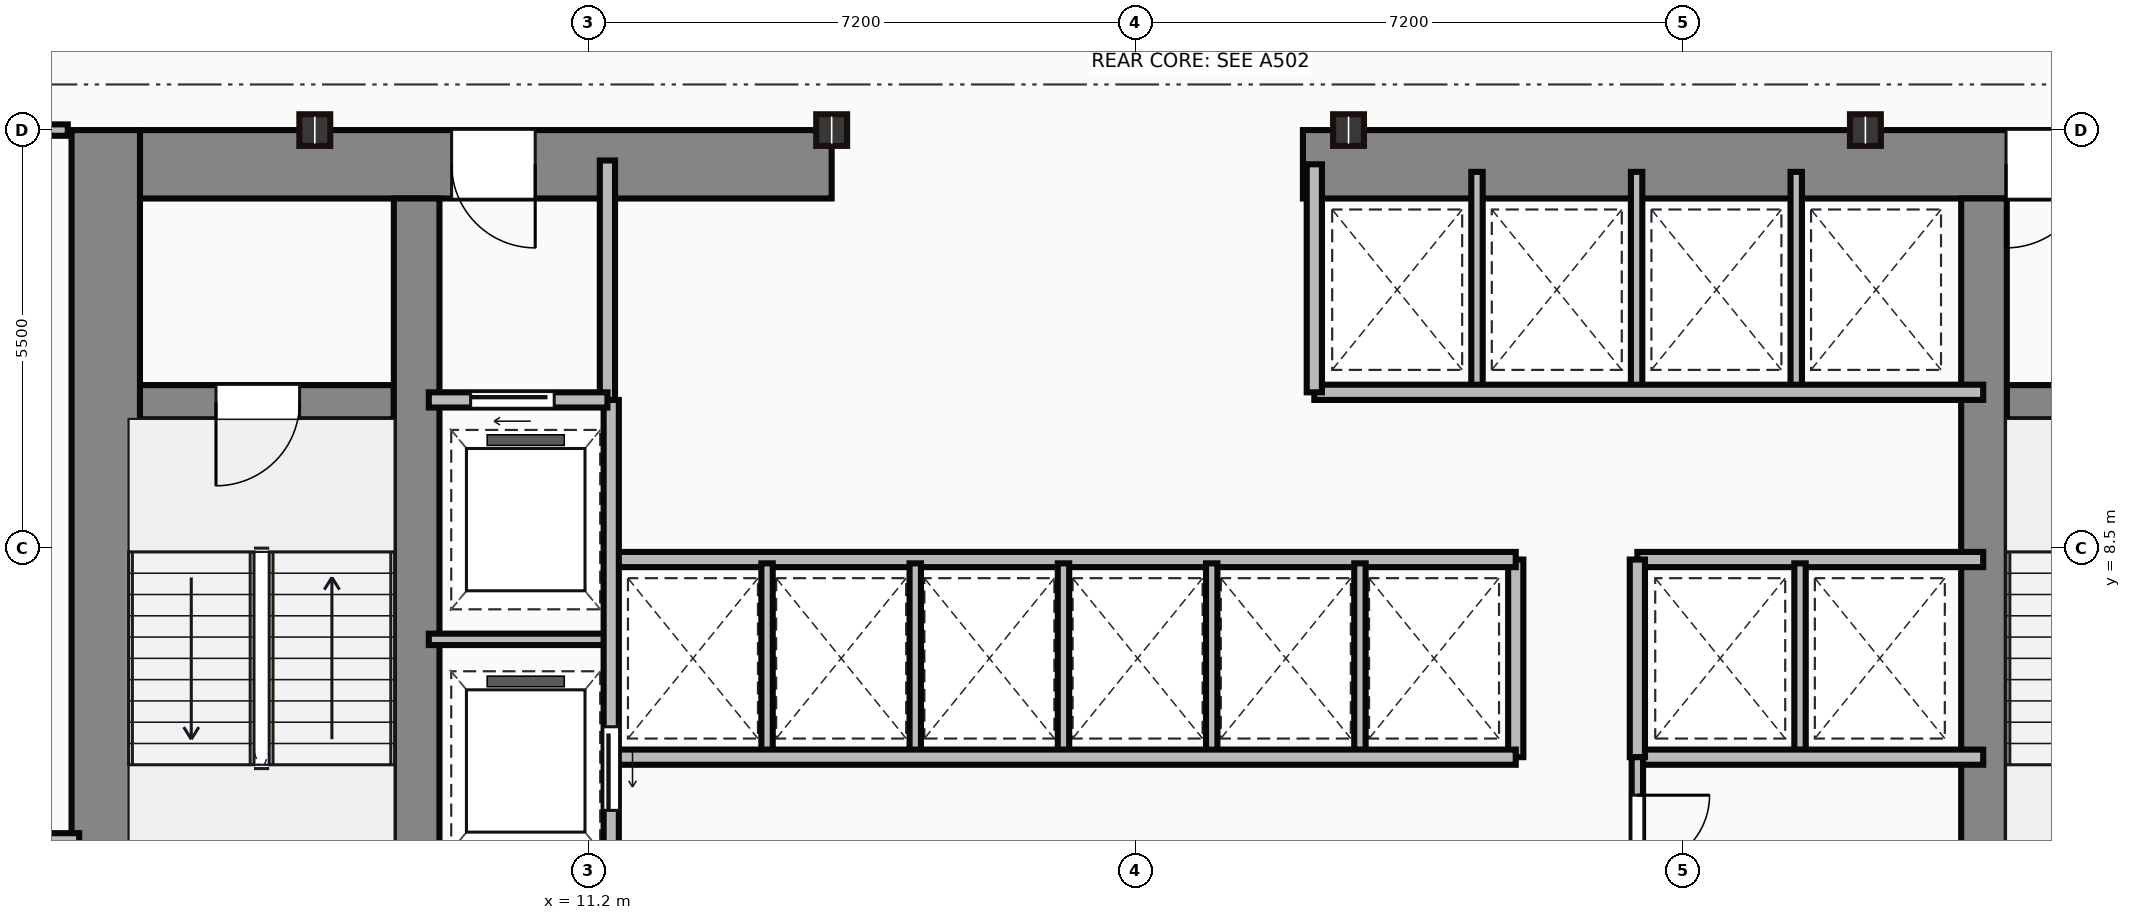
"""IFC4 building model, lengths in metres.
Left out: names, types, materials, properties, quantities, classifications, styles, units other than length and angle.
Written with IfcOpenShell. Run it as: python <this file> out.ifc"""

import sys

from ifc_helpers import new_model, si_unit, direction, frame, frame_2d, origin, origin_2d, place, context, subcontext, project, spatial, rectangle, i_section, extrude, source, transform, mapped, element, fill, save


model = new_model("IFC4")
c1 = context("Model", 3, precision=1e-05, world=origin(), true_north=direction((0.0, 1.0)))
c2 = subcontext(c1, "Body", "Model", "MODEL_VIEW")
j1 = project(units=[si_unit("LENGTHUNIT", "METRE"), si_unit("PLANEANGLEUNIT", "RADIAN")], contexts=[c1])
p1 = place(None, origin())
s1 = spatial("IfcSite", under=j1, at=p1, CompositionType="ELEMENT")
p2 = place(p1, origin())
s2 = spatial("IfcBuilding", under=s1, at=p2, CompositionType="ELEMENT")
p3 = place(p2, frame((0.0, 0.0, 32.5)))
s3 = spatial("IfcBuildingStorey", under=s2, at=p3, CompositionType="ELEMENT", Elevation=32.5)
m1 = source(origin(), c2, "Body", "SweptSolid", [
    extrude(rectangle(XDim=13.1, YDim=0.9, at=frame_2d((6.55, 0.0))), origin(), (0.0, 0.0, 1.0), 3.65),
])
p4 = place(p3, frame((4.85, 0.9, 0.0), z_axis=(0.0, 0.0, 1.0), x_axis=(0.0, 1.0, 0.0)))
e1 = element("IfcWall", 1, at=p4, inside=s3, PredefinedType="SHEAR", context=c2, shape_type="MappedRepresentation", body=[
    mapped(m1, transform((0.0, 0.0, 0.0))),
])
m2 = source(origin(), c2, "Body", "SweptSolid", [
    extrude(rectangle(XDim=9.1, YDim=0.9, at=frame_2d((4.55, 0.0))), origin(), (0.0, 0.0, 1.0), 3.65),
])
p5 = place(p3, frame((5.3, 13.55, 0.0), z_axis=(0.0, 0.0, 1.0), x_axis=(1.0, 0.0, 0.0)))
e2 = element("IfcWall", 2, at=p5, inside=s3, PredefinedType="SHEAR", context=c2, shape_type="MappedRepresentation", body=[
    mapped(m2, transform((0.0, 0.0, 0.0))),
])
p6 = place(p5, frame((4.1, 0.0, 0.0)))
e3 = element("IfcOpeningElement", 3, at=p6, cuts=e2, PredefinedType="OPENING", context=c2, shape_type="SweptSolid", body=[
    extrude(rectangle(XDim=1.1, YDim=2.15, at=frame_2d((0.55, 1.075))), frame((0.0, 0.46, 0.0), z_axis=(0.0, -1.0, 0.0), x_axis=(1.0, 0.0, 0.0)), (0.0, 0.0, 1.0), 0.92),
])
m3 = source(origin(), c2, "Body", "SweptSolid", [
    extrude(rectangle(XDim=12.6, YDim=0.9, at=frame_2d((6.3, 0.0))), origin(), (0.0, 0.0, 1.0), 3.65),
])
p7 = place(p3, frame((20.6, 13.55, 0.0), z_axis=(0.0, 0.0, 1.0), x_axis=(1.0, 0.0, 0.0)))
e4 = element("IfcWall", 4, at=p7, inside=s3, PredefinedType="SHEAR", context=c2, shape_type="MappedRepresentation", body=[
    mapped(m3, transform((0.0, 0.0, 0.0))),
])
p8 = place(p7, frame((9.25, 0.0, 0.0)))
e5 = element("IfcOpeningElement", 5, at=p8, cuts=e4, PredefinedType="OPENING", context=c2, shape_type="SweptSolid", body=[
    extrude(rectangle(XDim=1.1, YDim=2.15, at=frame_2d((0.55, 1.075))), frame((0.0, 0.46, 0.0), z_axis=(0.0, -1.0, 0.0), x_axis=(1.0, 0.0, 0.0)), (0.0, 0.0, 1.0), 0.92),
])
m4 = source(origin(), c2, "Body", "SweptSolid", [
    extrude(rectangle(XDim=12.2, YDim=0.6, at=frame_2d((6.1, 0.0))), origin(), (0.0, 0.0, 1.0), 3.65),
])
for number, where, z_axis, x_axis in (
    (6, (8.94, 0.9, 0.0), (0.0, 0.0, 1.0), (0.0, 1.0, 0.0)),
    (7, (29.56, 0.9, 0.0), (0.0, 0.0, 1.0), (0.0, 1.0, 0.0)),
):
    element("IfcWall", number, at=place(p3, frame(where, z_axis=z_axis, x_axis=x_axis)), inside=s3, PredefinedType="SHEAR", context=c2, shape_type="MappedRepresentation", body=[
        mapped(m4, transform((0.0, 0.0, 0.0))),
    ])
m5 = source(origin(), c2, "Body", "SweptSolid", [
    extrude(rectangle(XDim=3.39, YDim=0.45, at=frame_2d((1.695, 0.0))), origin(), (0.0, 0.0, 1.0), 3.65),
])
p9 = place(p3, frame((5.25, 10.42, 0.0), z_axis=(0.0, 0.0, 1.0), x_axis=(1.0, 0.0, 0.0)))
e8 = element("IfcWall", 8, at=p9, inside=s3, PredefinedType="SHEAR", context=c2, shape_type="MappedRepresentation", body=[
    mapped(m5, transform((0.0, 0.0, 0.0))),
])
p10 = place(p9, frame((1.05, 0.0, 0.0)))
e9 = element("IfcOpeningElement", 9, at=p10, cuts=e8, PredefinedType="OPENING", context=c2, shape_type="SweptSolid", body=[
    extrude(rectangle(XDim=1.1, YDim=2.15, at=frame_2d((0.55, 1.075))), frame((0.0, 0.235, 0.0), z_axis=(0.0, -1.0, 0.0), x_axis=(1.0, 0.0, 0.0)), (0.0, 0.0, 1.0), 0.47),
])
p11 = place(p3, frame((29.86, 10.42, 0.0), z_axis=(0.0, 0.0, 1.0), x_axis=(1.0, 0.0, 0.0)))
e10 = element("IfcWall", 10, at=p11, inside=s3, PredefinedType="SHEAR", context=c2, shape_type="MappedRepresentation", body=[
    mapped(m5, transform((0.0, 0.0, 0.0))),
])
p12 = place(p11, frame((1.1, 0.0, 0.0)))
e11 = element("IfcOpeningElement", 11, at=p12, cuts=e10, PredefinedType="OPENING", context=c2, shape_type="SweptSolid", body=[
    extrude(rectangle(XDim=1.1, YDim=2.15, at=frame_2d((0.55, 1.075))), frame((0.0, 0.235, 0.0), z_axis=(0.0, -1.0, 0.0), x_axis=(1.0, 0.0, 0.0)), (0.0, 0.0, 1.0), 0.47),
])
m6 = source(origin(), c2, "Body", "SweptSolid", [
    extrude(i_section(OverallWidth=0.406, OverallDepth=0.416, WebThickness=0.03, FlangeThickness=0.048, at=origin_2d()), origin(), (0.0, 0.0, 1.0), 3.65),
])
for number, where, z_axis, x_axis in (
    (12, (7.6, 14.0, 0.0), (0.0, 0.0, 1.0), (1.0, 0.0, 0.0)),
    (13, (14.4, 14.0, 0.0), (0.0, 0.0, 1.0), (1.0, 0.0, 0.0)),
    (14, (21.2, 14.0, 0.0), (0.0, 0.0, 1.0), (1.0, 0.0, 0.0)),
    (15, (28.0, 14.0, 0.0), (0.0, 0.0, 1.0), (1.0, 0.0, 0.0)),
):
    element("IfcColumn", number, at=place(p3, frame(where, z_axis=z_axis, x_axis=x_axis)), inside=s3, PredefinedType="COLUMN", context=c2, shape_type="MappedRepresentation", body=[
        mapped(m6, transform((0.0, 0.0, 0.0))),
    ])
m7 = source(origin(), c2, "Body", "SweptSolid", [
    extrude(rectangle(XDim=4.5, YDim=0.25, at=frame_2d((2.25, 0.0))), origin(), (0.0, 0.0, 1.0), 3.4),
])
p13 = place(p3, frame((0.0, 4.625, 0.0), z_axis=(0.0, 0.0, 1.0), x_axis=(1.0, 0.0, 0.0)))
e16 = element("IfcWall", 16, at=p13, inside=s3, PredefinedType="STANDARD", context=c2, shape_type="MappedRepresentation", body=[
    mapped(m7, transform((0.0, 0.0, 0.0))),
])
m8 = source(origin(), c2, "Body", "SweptSolid", [
    extrude(rectangle(XDim=3.18, YDim=0.2, at=frame_2d((1.59, 0.0))), origin(), (0.0, 0.0, 1.0), 3.4),
])
p14 = place(p3, frame((11.45, 10.42, 0.0), z_axis=(0.0, 0.0, 1.0), x_axis=(0.0, 1.0, 0.0)))
e17 = element("IfcWall", 17, at=p14, inside=s3, PredefinedType="PARTITIONING", context=c2, shape_type="MappedRepresentation", body=[
    mapped(m8, transform((0.0, 0.0, 0.0))),
])
m9 = source(origin(), c2, "Body", "SweptSolid", [
    extrude(rectangle(XDim=2.35, YDim=0.2, at=frame_2d((1.175, 0.0))), origin(), (0.0, 0.0, 1.0), 3.4),
])
p15 = place(p3, frame((9.1, 10.45, 0.0), z_axis=(0.0, 0.0, 1.0), x_axis=(1.0, 0.0, 0.0)))
e18 = element("IfcWall", 18, at=p15, inside=s3, PredefinedType="PARTITIONING", context=c2, shape_type="MappedRepresentation", body=[
    mapped(m9, transform((0.0, 0.0, 0.0))),
])
p16 = place(p15, frame((0.55, 0.0, 0.0)))
e19 = element("IfcOpeningElement", 19, at=p16, cuts=e18, PredefinedType="OPENING", context=c2, shape_type="SweptSolid", body=[
    extrude(rectangle(XDim=1.1, YDim=2.15, at=frame_2d((0.55, 1.075))), frame((0.0, 0.11, 0.0), z_axis=(0.0, -1.0, 0.0), x_axis=(1.0, 0.0, 0.0)), (0.0, 0.0, 1.0), 0.22),
])
m10 = source(origin(), c2, "Body", "SweptSolid", [
    extrude(rectangle(XDim=9.6, YDim=0.2, at=frame_2d((4.8, 0.0))), origin(), (0.0, 0.0, 1.0), 3.4),
])
p17 = place(p3, frame((11.5, 0.85, 0.0), z_axis=(0.0, 0.0, 1.0), x_axis=(0.0, 1.0, 0.0)))
e20 = element("IfcWall", 20, at=p17, inside=s3, PredefinedType="PARTITIONING", context=c2, shape_type="MappedRepresentation", body=[
    mapped(m10, transform((0.0, 0.0, 0.0))),
])
p18 = place(p17, frame((4.2, 0.0, 0.0)))
e21 = element("IfcOpeningElement", 21, at=p18, cuts=e20, PredefinedType="OPENING", context=c2, shape_type="SweptSolid", body=[
    extrude(rectangle(XDim=1.1, YDim=2.15, at=frame_2d((0.55, 1.075))), frame((0.0, 0.11, 0.0), z_axis=(0.0, -1.0, 0.0), x_axis=(1.0, 0.0, 0.0)), (0.0, 0.0, 1.0), 0.22),
])
p19 = place(p17, frame((0.9, 0.0, 0.0)))
e22 = element("IfcOpeningElement", 22, at=p19, cuts=e20, PredefinedType="OPENING", context=c2, shape_type="SweptSolid", body=[
    extrude(rectangle(XDim=1.2, YDim=2.15, at=frame_2d((0.6, 1.075))), frame((0.0, 0.11, 0.0), z_axis=(0.0, -1.0, 0.0), x_axis=(1.0, 0.0, 0.0)), (0.0, 0.0, 1.0), 0.22),
])
m11 = source(origin(), c2, "Body", "SweptSolid", [
    extrude(rectangle(XDim=2.4, YDim=0.15, at=frame_2d((1.2, 0.0))), origin(), (0.0, 0.0, 1.0), 3.4),
])
p20 = place(p3, frame((9.1, 7.3, 0.0), z_axis=(0.0, 0.0, 1.0), x_axis=(1.0, 0.0, 0.0)))
e23 = element("IfcWall", 23, at=p20, inside=s3, PredefinedType="PARTITIONING", context=c2, shape_type="MappedRepresentation", body=[
    mapped(m11, transform((0.0, 0.0, 0.0))),
])
m12 = source(origin(), c2, "Body", "SweptSolid", [
    extrude(rectangle(XDim=11.85, YDim=0.2, at=frame_2d((5.925, 0.0))), origin(), (0.0, 0.0, 1.0), 3.4),
])
for number, where, z_axis, x_axis in (
    (24, (11.55, 5.75, 0.0), (0.0, 0.0, 1.0), (1.0, 0.0, 0.0)),
    (25, (11.55, 8.35, 0.0), (0.0, 0.0, 1.0), (1.0, 0.0, 0.0)),
):
    element("IfcWall", number, at=place(p3, frame(where, z_axis=z_axis, x_axis=x_axis)), inside=s3, PredefinedType="PARTITIONING", context=c2, shape_type="MappedRepresentation", body=[
        mapped(m12, transform((0.0, 0.0, 0.0))),
    ])
m13 = source(origin(), c2, "Body", "SweptSolid", [
    extrude(rectangle(XDim=2.6, YDim=0.2, at=frame_2d((1.3, 0.0))), origin(), (0.0, 0.0, 1.0), 3.4),
])
p21 = place(p3, frame((23.4, 5.75, 0.0), z_axis=(0.0, 0.0, 1.0), x_axis=(0.0, 1.0, 0.0)))
e26 = element("IfcWall", 26, at=p21, inside=s3, PredefinedType="PARTITIONING", context=c2, shape_type="MappedRepresentation", body=[
    mapped(m13, transform((0.0, 0.0, 0.0))),
])
m14 = source(origin(), c2, "Body", "SweptSolid", [
    extrude(rectangle(XDim=2.5, YDim=0.15, at=frame_2d((1.25, 0.0))), origin(), (0.0, 0.0, 1.0), 3.4),
])
for number, where, z_axis, x_axis in (
    (27, (13.55, 5.8, 0.0), (0.0, 0.0, 1.0), (0.0, 1.0, 0.0)),
    (28, (15.5, 5.8, 0.0), (0.0, 0.0, 1.0), (0.0, 1.0, 0.0)),
    (29, (17.45, 5.8, 0.0), (0.0, 0.0, 1.0), (0.0, 1.0, 0.0)),
    (30, (19.4, 5.8, 0.0), (0.0, 0.0, 1.0), (0.0, 1.0, 0.0)),
    (31, (21.35, 5.8, 0.0), (0.0, 0.0, 1.0), (0.0, 1.0, 0.0)),
):
    element("IfcWall", number, at=place(p3, frame(where, z_axis=z_axis, x_axis=x_axis)), inside=s3, PredefinedType="PARTITIONING", context=c2, shape_type="MappedRepresentation", body=[
        mapped(m14, transform((0.0, 0.0, 0.0))),
    ])
m15 = source(origin(), c2, "Body", "SweptSolid", [
    extrude(rectangle(XDim=8.8, YDim=0.2, at=frame_2d((4.4, 0.0))), origin(), (0.0, 0.0, 1.0), 3.4),
])
p22 = place(p3, frame((20.75, 10.55, 0.0), z_axis=(0.0, 0.0, 1.0), x_axis=(1.0, 0.0, 0.0)))
e32 = element("IfcWall", 32, at=p22, inside=s3, PredefinedType="PARTITIONING", context=c2, shape_type="MappedRepresentation", body=[
    mapped(m15, transform((0.0, 0.0, 0.0))),
])
m16 = source(origin(), c2, "Body", "SweptSolid", [
    extrude(rectangle(XDim=3.0, YDim=0.2, at=frame_2d((1.5, 0.0))), origin(), (0.0, 0.0, 1.0), 3.4),
])
p23 = place(p3, frame((20.75, 10.55, 0.0), z_axis=(0.0, 0.0, 1.0), x_axis=(0.0, 1.0, 0.0)))
e33 = element("IfcWall", 33, at=p23, inside=s3, PredefinedType="PARTITIONING", context=c2, shape_type="MappedRepresentation", body=[
    mapped(m16, transform((0.0, 0.0, 0.0))),
])
m17 = source(origin(), c2, "Body", "SweptSolid", [
    extrude(rectangle(XDim=2.85, YDim=0.15, at=frame_2d((1.425, 0.0))), origin(), (0.0, 0.0, 1.0), 3.4),
])
for number, where, z_axis, x_axis in (
    (34, (22.89, 10.6, 0.0), (0.0, 0.0, 1.0), (0.0, 1.0, 0.0)),
    (35, (24.99, 10.6, 0.0), (0.0, 0.0, 1.0), (0.0, 1.0, 0.0)),
    (36, (27.09, 10.6, 0.0), (0.0, 0.0, 1.0), (0.0, 1.0, 0.0)),
):
    element("IfcWall", number, at=place(p3, frame(where, z_axis=z_axis, x_axis=x_axis)), inside=s3, PredefinedType="PARTITIONING", context=c2, shape_type="MappedRepresentation", body=[
        mapped(m17, transform((0.0, 0.0, 0.0))),
    ])
m18 = source(origin(), c2, "Body", "SweptSolid", [
    extrude(rectangle(XDim=4.55, YDim=0.2, at=frame_2d((2.275, 0.0))), origin(), (0.0, 0.0, 1.0), 3.4),
])
for number, where, z_axis, x_axis in (
    (37, (25.0, 8.35, 0.0), (0.0, 0.0, 1.0), (1.0, 0.0, 0.0)),
    (38, (25.0, 5.75, 0.0), (0.0, 0.0, 1.0), (1.0, 0.0, 0.0)),
):
    element("IfcWall", number, at=place(p3, frame(where, z_axis=z_axis, x_axis=x_axis)), inside=s3, PredefinedType="PARTITIONING", context=c2, shape_type="MappedRepresentation", body=[
        mapped(m18, transform((0.0, 0.0, 0.0))),
    ])
p24 = place(p3, frame((25.0, 5.75, 0.0), z_axis=(0.0, 0.0, 1.0), x_axis=(0.0, 1.0, 0.0)))
e39 = element("IfcWall", 39, at=p24, inside=s3, PredefinedType="PARTITIONING", context=c2, shape_type="MappedRepresentation", body=[
    mapped(m13, transform((0.0, 0.0, 0.0))),
])
p25 = place(p3, frame((27.14, 5.8, 0.0), z_axis=(0.0, 0.0, 1.0), x_axis=(0.0, 1.0, 0.0)))
e40 = element("IfcWall", 40, at=p25, inside=s3, PredefinedType="PARTITIONING", context=c2, shape_type="MappedRepresentation", body=[
    mapped(m14, transform((0.0, 0.0, 0.0))),
])
m19 = source(origin(), c2, "Body", "SweptSolid", [
    extrude(rectangle(XDim=4.9, YDim=0.15, at=frame_2d((2.45, 0.0))), origin(), (0.0, 0.0, 1.0), 3.4),
])
p26 = place(p3, frame((25.0, 0.85, 0.0), z_axis=(0.0, 0.0, 1.0), x_axis=(0.0, 1.0, 0.0)))
e41 = element("IfcWall", 41, at=p26, inside=s3, PredefinedType="PARTITIONING", context=c2, shape_type="MappedRepresentation", body=[
    mapped(m19, transform((0.0, 0.0, 0.0))),
])
p27 = place(p26, frame((1.8, 0.0, 0.0)))
e42 = element("IfcOpeningElement", 42, at=p27, cuts=e41, PredefinedType="OPENING", context=c2, shape_type="SweptSolid", body=[
    extrude(rectangle(XDim=0.95, YDim=2.15, at=frame_2d((0.475, 1.075))), frame((0.0, 0.085, 0.0), z_axis=(0.0, -1.0, 0.0), x_axis=(1.0, 0.0, 0.0)), (0.0, 0.0, 1.0), 0.17),
])
p28 = place(p26, frame((3.45, 0.0, 0.0)))
e43 = element("IfcOpeningElement", 43, at=p28, cuts=e41, PredefinedType="OPENING", context=c2, shape_type="SweptSolid", body=[
    extrude(rectangle(XDim=0.95, YDim=2.15, at=frame_2d((0.475, 1.075))), frame((0.0, 0.085, 0.0), z_axis=(0.0, -1.0, 0.0), x_axis=(1.0, 0.0, 0.0)), (0.0, 0.0, 1.0), 0.17),
])
m20 = source(origin(), c2, "Body", "SweptSolid", [
    extrude(rectangle(XDim=0.95, YDim=0.15, at=frame_2d((0.475, 0.0))), origin(), (0.0, 0.0, 1.0), 2.625),
])
p29 = place(p3, frame((4.35, 14.0, 0.0), z_axis=(0.0, 0.0, 1.0), x_axis=(-1.0, 0.0, 0.0)))
e44 = element("IfcWall", 44, at=p29, inside=s3, PredefinedType="PARTITIONING", context=c2, shape_type="MappedRepresentation", body=[
    mapped(m20, transform((0.0, 0.0, 0.0))),
])
m21 = source(origin(), c2, "Body", "SweptSolid", [
    extrude(rectangle(XDim=1.1, YDim=2.15, at=frame_2d((0.55, 1.075))), frame((0.0, 0.025, 0.0), z_axis=(0.0, -1.0, 0.0), x_axis=(1.0, 0.0, 0.0)), (0.0, 0.0, 1.0), 0.05),
])
p30 = place(p10, frame((1.1, 0.0, 0.0), z_axis=(0.0, 0.0, 1.0), x_axis=(-1.0, 0.0, 0.0)))
e45 = element("IfcDoor", 45, at=p30, inside=s3, OperationType="SINGLE_SWING_LEFT", PredefinedType="DOOR", context=c2, shape_type="MappedRepresentation", body=[
    mapped(m21, transform((0.0, 0.0, 0.0))),
])
fill(e9, e45)
p31 = place(p6, origin())
e46 = element("IfcDoor", 46, at=p31, inside=s3, OperationType="SINGLE_SWING_RIGHT", PredefinedType="DOOR", context=c2, shape_type="MappedRepresentation", body=[
    mapped(m21, transform((0.0, 0.0, 0.0))),
])
fill(e3, e46)
p32 = place(p8, origin())
e47 = element("IfcDoor", 47, at=p32, inside=s3, OperationType="SINGLE_SWING_LEFT", PredefinedType="DOOR", context=c2, shape_type="MappedRepresentation", body=[
    mapped(m21, transform((0.0, 0.0, 0.0))),
])
fill(e5, e47)
p33 = place(p16, origin())
e48 = element("IfcDoor", 48, at=p33, inside=s3, OperationType="SLIDING_TO_LEFT", PredefinedType="DOOR", context=c2, shape_type="MappedRepresentation", body=[
    mapped(m21, transform((0.0, 0.0, 0.0))),
])
fill(e19, e48)
p34 = place(p18, frame((1.1, 0.0, 0.0), z_axis=(0.0, 0.0, 1.0), x_axis=(-1.0, 0.0, 0.0)))
e49 = element("IfcDoor", 49, at=p34, inside=s3, OperationType="SLIDING_TO_LEFT", PredefinedType="DOOR", context=c2, shape_type="MappedRepresentation", body=[
    mapped(m21, transform((0.0, 0.0, 0.0))),
])
fill(e21, e49)
m22 = source(origin(), c2, "Body", "SweptSolid", [
    extrude(rectangle(XDim=0.95, YDim=2.15, at=frame_2d((0.475, 1.075))), frame((0.0, 0.025, 0.0), z_axis=(0.0, -1.0, 0.0), x_axis=(1.0, 0.0, 0.0)), (0.0, 0.0, 1.0), 0.05),
])
p35 = place(p28, origin())
e50 = element("IfcDoor", 50, at=p35, inside=s3, OperationType="SINGLE_SWING_RIGHT", PredefinedType="DOOR", context=c2, shape_type="MappedRepresentation", body=[
    mapped(m22, transform((0.0, 0.0, 0.0))),
])
fill(e43, e50)
save(model, sys.argv[1])
